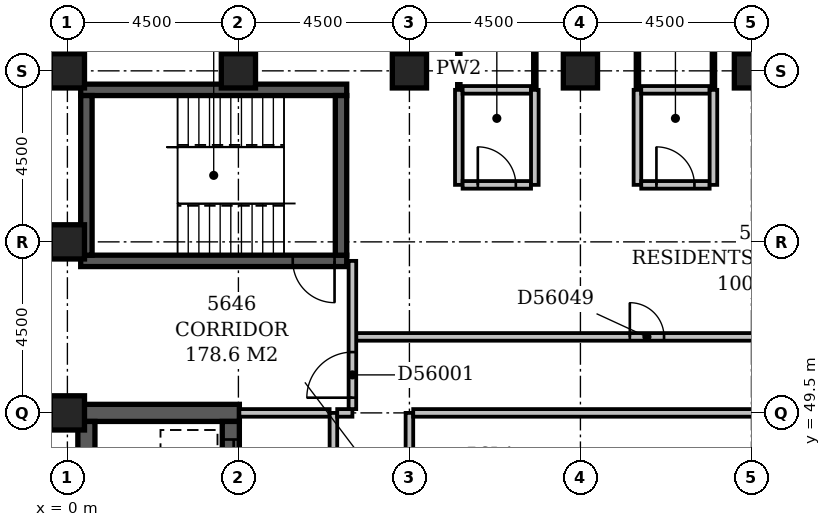
"""IFC4 building model, lengths in metres.
Left out: names, types, materials, properties, quantities, classifications, styles, units other than length and angle.
Written with IfcOpenShell. Run it as: python <this file> out.ifc"""

import sys

from ifc_helpers import new_model, si_unit, direction, frame, frame_2d, origin, origin_2d, place, context, subcontext, project, spatial, rectangle, extrude, element, fill, save


model = new_model("IFC4")
c1 = context("Model", 3, precision=1e-05, world=origin(), true_north=direction((0.0, 1.0)))
c2 = subcontext(c1, "Body", "Model", "MODEL_VIEW")
j1 = project(units=[si_unit("LENGTHUNIT", "METRE"), si_unit("PLANEANGLEUNIT", "RADIAN")], contexts=[c1])
p1 = place(None, origin())
s1 = spatial("IfcSite", under=j1, at=p1, CompositionType="ELEMENT")
p2 = place(p1, origin())
s2 = spatial("IfcBuilding", under=s1, at=p2, CompositionType="ELEMENT")
p3 = place(p2, frame((0.0, 0.0, 218.6)))
s3 = spatial("IfcBuildingStorey", under=s2, at=p3, CompositionType="ELEMENT", Elevation=218.6)
p4 = place(p3, frame((0.275, 49.5, -0.3), z_axis=(0.0, 0.0, 1.0), x_axis=(1.0, 0.0, 0.0)))
e1 = element("IfcWall", 1, at=p4, inside=s3, PredefinedType="SHEAR", context=c2, shape_type="SweptSolid", body=[
    extrude(rectangle(XDim=4.25, YDim=0.45, at=frame_2d((2.125, 0.0))), origin(), (0.0, 0.0, 1.0), 3.6),
])
p5 = place(p3, frame((0.35, 53.5, -0.3), z_axis=(0.0, 0.0, 1.0), x_axis=(1.0, 0.0, 0.0)))
e2 = element("IfcWall", 2, at=p5, inside=s3, PredefinedType="SHEAR", context=c2, shape_type="SweptSolid", body=[
    extrude(rectangle(XDim=7.0, YDim=0.3, at=frame_2d((3.5, 0.0))), origin(), (0.0, 0.0, 1.0), 3.6),
])
p6 = place(p5, frame((5.58, 0.0, 0.3)))
e3 = element("IfcOpeningElement", 3, at=p6, cuts=e2, PredefinedType="OPENING", context=c2, shape_type="SweptSolid", body=[
    extrude(rectangle(XDim=1.1, YDim=2.1, at=frame_2d((0.55, 1.05))), frame((0.0, 0.162, 0.0), z_axis=(0.0, -1.0, 0.0), x_axis=(1.0, 0.0, 0.0)), (0.0, 0.0, 1.0), 0.324),
])
p7 = place(p3, frame((0.35, 58.0, -0.3), z_axis=(0.0, 0.0, 1.0), x_axis=(1.0, 0.0, 0.0)))
e4 = element("IfcWall", 4, at=p7, inside=s3, PredefinedType="SHEAR", context=c2, shape_type="SweptSolid", body=[
    extrude(rectangle(XDim=7.0, YDim=0.3, at=frame_2d((3.5, 0.0))), origin(), (0.0, 0.0, 1.0), 3.6),
])
p8 = place(p3, frame((0.5, 27.15, -0.3), z_axis=(0.0, 0.0, 1.0), x_axis=(0.0, 1.0, 0.0)))
e5 = element("IfcWall", 5, at=p8, inside=s3, PredefinedType="SHEAR", context=c2, shape_type="SweptSolid", body=[
    extrude(rectangle(XDim=22.125, YDim=0.45, at=frame_2d((11.062, 0.0))), origin(), (0.0, 0.0, 1.0), 3.6),
])
p9 = place(p3, frame((0.5, 53.65, -0.3), z_axis=(0.0, 0.0, 1.0), x_axis=(0.0, 1.0, 0.0)))
e6 = element("IfcWall", 6, at=p9, inside=s3, PredefinedType="SHEAR", context=c2, shape_type="SweptSolid", body=[
    extrude(rectangle(XDim=4.2, YDim=0.3, at=frame_2d((2.1, 0.0))), origin(), (0.0, 0.0, 1.0), 3.6),
])
p10 = place(p3, frame((4.3, 27.15, -0.3), z_axis=(0.0, 0.0, 1.0), x_axis=(0.0, 1.0, 0.0)))
e7 = element("IfcWall", 7, at=p10, inside=s3, PredefinedType="SHEAR", context=c2, shape_type="SweptSolid", body=[
    extrude(rectangle(XDim=22.125, YDim=0.45, at=frame_2d((11.062, 0.0))), origin(), (0.0, 0.0, 1.0), 3.6),
])
p11 = place(p10, frame((3.05, 0.0, 0.3)))
e8 = element("IfcOpeningElement", 8, at=p11, cuts=e7, PredefinedType="OPENING", context=c2, shape_type="SweptSolid", body=[
    extrude(rectangle(XDim=1.1, YDim=2.1, at=frame_2d((0.55, 1.05))), frame((0.0, 0.237, 0.0), z_axis=(0.0, -1.0, 0.0), x_axis=(1.0, 0.0, 0.0)), (0.0, 0.0, 1.0), 0.474),
])
p12 = place(p10, frame((0.55, 0.0, 0.3)))
e9 = element("IfcOpeningElement", 9, at=p12, cuts=e7, PredefinedType="OPENING", context=c2, shape_type="SweptSolid", body=[
    extrude(rectangle(XDim=1.1, YDim=2.1, at=frame_2d((0.55, 1.05))), frame((0.0, 0.237, 0.0), z_axis=(0.0, -1.0, 0.0), x_axis=(1.0, 0.0, 0.0)), (0.0, 0.0, 1.0), 0.474),
])
p13 = place(p10, frame((20.55, 0.0, 0.3)))
e10 = element("IfcOpeningElement", 10, at=p13, cuts=e7, PredefinedType="OPENING", context=c2, shape_type="SweptSolid", body=[
    extrude(rectangle(XDim=1.1, YDim=2.1, at=frame_2d((0.55, 1.05))), frame((0.0, 0.237, 0.0), z_axis=(0.0, -1.0, 0.0), x_axis=(1.0, 0.0, 0.0)), (0.0, 0.0, 1.0), 0.474),
])
p14 = place(p10, frame((18.05, 0.0, 0.3)))
e11 = element("IfcOpeningElement", 11, at=p14, cuts=e7, PredefinedType="OPENING", context=c2, shape_type="SweptSolid", body=[
    extrude(rectangle(XDim=1.1, YDim=2.1, at=frame_2d((0.55, 1.05))), frame((0.0, 0.237, 0.0), z_axis=(0.0, -1.0, 0.0), x_axis=(1.0, 0.0, 0.0)), (0.0, 0.0, 1.0), 0.474),
])
p15 = place(p10, frame((15.55, 0.0, 0.3)))
e12 = element("IfcOpeningElement", 12, at=p15, cuts=e7, PredefinedType="OPENING", context=c2, shape_type="SweptSolid", body=[
    extrude(rectangle(XDim=1.1, YDim=2.1, at=frame_2d((0.55, 1.05))), frame((0.0, 0.237, 0.0), z_axis=(0.0, -1.0, 0.0), x_axis=(1.0, 0.0, 0.0)), (0.0, 0.0, 1.0), 0.474),
])
p16 = place(p10, frame((13.05, 0.0, 0.3)))
e13 = element("IfcOpeningElement", 13, at=p16, cuts=e7, PredefinedType="OPENING", context=c2, shape_type="SweptSolid", body=[
    extrude(rectangle(XDim=1.1, YDim=2.1, at=frame_2d((0.55, 1.05))), frame((0.0, 0.237, 0.0), z_axis=(0.0, -1.0, 0.0), x_axis=(1.0, 0.0, 0.0)), (0.0, 0.0, 1.0), 0.474),
])
p17 = place(p10, frame((10.55, 0.0, 0.3)))
e14 = element("IfcOpeningElement", 14, at=p17, cuts=e7, PredefinedType="OPENING", context=c2, shape_type="SweptSolid", body=[
    extrude(rectangle(XDim=1.1, YDim=2.1, at=frame_2d((0.55, 1.05))), frame((0.0, 0.237, 0.0), z_axis=(0.0, -1.0, 0.0), x_axis=(1.0, 0.0, 0.0)), (0.0, 0.0, 1.0), 0.474),
])
p18 = place(p10, frame((8.05, 0.0, 0.3)))
e15 = element("IfcOpeningElement", 15, at=p18, cuts=e7, PredefinedType="OPENING", context=c2, shape_type="SweptSolid", body=[
    extrude(rectangle(XDim=1.1, YDim=2.1, at=frame_2d((0.55, 1.05))), frame((0.0, 0.237, 0.0), z_axis=(0.0, -1.0, 0.0), x_axis=(1.0, 0.0, 0.0)), (0.0, 0.0, 1.0), 0.474),
])
p19 = place(p10, frame((5.55, 0.0, 0.3)))
e16 = element("IfcOpeningElement", 16, at=p19, cuts=e7, PredefinedType="OPENING", context=c2, shape_type="SweptSolid", body=[
    extrude(rectangle(XDim=1.1, YDim=2.1, at=frame_2d((0.55, 1.05))), frame((0.0, 0.237, 0.0), z_axis=(0.0, -1.0, 0.0), x_axis=(1.0, 0.0, 0.0)), (0.0, 0.0, 1.0), 0.474),
])
p20 = place(p3, frame((7.2, 53.65, -0.3), z_axis=(0.0, 0.0, 1.0), x_axis=(0.0, 1.0, 0.0)))
e17 = element("IfcWall", 17, at=p20, inside=s3, PredefinedType="SHEAR", context=c2, shape_type="SweptSolid", body=[
    extrude(rectangle(XDim=4.2, YDim=0.3, at=frame_2d((2.1, 0.0))), origin(), (0.0, 0.0, 1.0), 3.6),
])
for number, where, z_axis, x_axis in (
    (18, (0.0, 49.5, -0.3), (0.0, 0.0, 1.0), (1.0, 0.0, 0.0)),
    (19, (0.0, 54.0, -0.3), (0.0, 0.0, 1.0), (1.0, 0.0, 0.0)),
    (20, (0.0, 58.5, -0.3), (0.0, 0.0, 1.0), (1.0, 0.0, 0.0)),
    (21, (4.5, 58.5, -0.3), (0.0, 0.0, 1.0), (1.0, 0.0, 0.0)),
    (22, (9.0, 58.5, -0.3), (0.0, 0.0, 1.0), (1.0, 0.0, 0.0)),
    (23, (13.5, 58.5, -0.3), (0.0, 0.0, 1.0), (1.0, 0.0, 0.0)),
    (24, (18.0, 58.5, -0.3), (0.0, 0.0, 1.0), (1.0, 0.0, 0.0)),
):
    element("IfcColumn", number, at=place(p3, frame(where, z_axis=z_axis, x_axis=x_axis)), inside=s3, PredefinedType="COLUMN", context=c2, shape_type="SweptSolid", body=[
        extrude(rectangle(XDim=0.9, YDim=0.9, at=origin_2d()), origin(), (0.0, 0.0, 1.0), 3.6),
    ])
p21 = place(p3, frame((7.0, 34.6, 0.0), z_axis=(0.0, 0.0, 1.0), x_axis=(0.0, 1.0, 0.0)))
e25 = element("IfcWall", 25, at=p21, inside=s3, PredefinedType="PARTITIONING", context=c2, shape_type="SweptSolid", body=[
    extrude(rectangle(XDim=14.9, YDim=0.2, at=frame_2d((7.45, 0.0))), origin(), (0.0, 0.0, 1.0), 3.3),
])
p22 = place(p21, frame((2.8, 0.0, 0.0)))
e26 = element("IfcOpeningElement", 26, at=p22, cuts=e25, PredefinedType="OPENING", context=c2, shape_type="SweptSolid", body=[
    extrude(rectangle(XDim=1.2, YDim=2.1, at=frame_2d((0.6, 1.05))), frame((0.0, 0.112, 0.0), z_axis=(0.0, -1.0, 0.0), x_axis=(1.0, 0.0, 0.0)), (0.0, 0.0, 1.0), 0.224),
])
p23 = place(p21, frame((9.8, 0.0, 0.0)))
e27 = element("IfcOpeningElement", 27, at=p23, cuts=e25, PredefinedType="OPENING", context=c2, shape_type="SweptSolid", body=[
    extrude(rectangle(XDim=1.2, YDim=2.1, at=frame_2d((0.6, 1.05))), frame((0.0, 0.112, 0.0), z_axis=(0.0, -1.0, 0.0), x_axis=(1.0, 0.0, 0.0)), (0.0, 0.0, 1.0), 0.224),
])
p24 = place(p3, frame((4.525, 49.5, 0.0), z_axis=(0.0, 0.0, 1.0), x_axis=(1.0, 0.0, 0.0)))
e28 = element("IfcWall", 28, at=p24, inside=s3, PredefinedType="PARTITIONING", context=c2, shape_type="SweptSolid", body=[
    extrude(rectangle(XDim=2.375, YDim=0.2, at=frame_2d((1.188, 0.0))), origin(), (0.0, 0.0, 1.0), 3.3),
])
p25 = place(p3, frame((7.1, 49.5, 0.0), z_axis=(0.0, 0.0, 1.0), x_axis=(1.0, 0.0, 0.0)))
e29 = element("IfcWall", 29, at=p25, inside=s3, PredefinedType="PARTITIONING", context=c2, shape_type="SweptSolid", body=[
    extrude(rectangle(XDim=0.4, YDim=0.2, at=frame_2d((0.2, 0.0))), origin(), (0.0, 0.0, 1.0), 3.3),
])
p26 = place(p3, frame((7.5, 49.6, 0.0), z_axis=(0.0, 0.0, 1.0), x_axis=(0.0, 1.0, 0.0)))
e30 = element("IfcWall", 30, at=p26, inside=s3, PredefinedType="PARTITIONING", context=c2, shape_type="SweptSolid", body=[
    extrude(rectangle(XDim=3.9, YDim=0.2, at=frame_2d((1.95, 0.0))), origin(), (0.0, 0.0, 1.0), 3.3),
])
p27 = place(p26, frame((0.3, 0.0, 0.0)))
e31 = element("IfcOpeningElement", 31, at=p27, cuts=e30, PredefinedType="OPENING", context=c2, shape_type="SweptSolid", body=[
    extrude(rectangle(XDim=1.2, YDim=2.1, at=frame_2d((0.6, 1.05))), frame((0.0, 0.112, 0.0), z_axis=(0.0, -1.0, 0.0), x_axis=(1.0, 0.0, 0.0)), (0.0, 0.0, 1.0), 0.224),
])
p28 = place(p3, frame((9.0, 38.0, 0.0), z_axis=(0.0, 0.0, 1.0), x_axis=(0.0, 1.0, 0.0)))
e32 = element("IfcWall", 32, at=p28, inside=s3, PredefinedType="PARTITIONING", context=c2, shape_type="SweptSolid", body=[
    extrude(rectangle(XDim=11.5, YDim=0.2, at=frame_2d((5.75, 0.0))), origin(), (0.0, 0.0, 1.0), 3.3),
])
p29 = place(p28, frame((5.25, 0.0, 0.0)))
e33 = element("IfcOpeningElement", 33, at=p29, cuts=e32, PredefinedType="OPENING", context=c2, shape_type="SweptSolid", body=[
    extrude(rectangle(XDim=0.9, YDim=2.1, at=frame_2d((0.45, 1.05))), frame((0.0, 0.112, 0.0), z_axis=(0.0, -1.0, 0.0), x_axis=(1.0, 0.0, 0.0)), (0.0, 0.0, 1.0), 0.224),
])
p30 = place(p3, frame((9.1, 49.5, 0.0), z_axis=(0.0, 0.0, 1.0), x_axis=(1.0, 0.0, 0.0)))
e34 = element("IfcWall", 34, at=p30, inside=s3, PredefinedType="PARTITIONING", context=c2, shape_type="SweptSolid", body=[
    extrude(rectangle(XDim=11.3, YDim=0.2, at=frame_2d((5.65, 0.0))), origin(), (0.0, 0.0, 1.0), 3.3),
])
p31 = place(p3, frame((7.6, 51.5, 0.0), z_axis=(0.0, 0.0, 1.0), x_axis=(1.0, 0.0, 0.0)))
e35 = element("IfcWall", 35, at=p31, inside=s3, PredefinedType="PARTITIONING", context=c2, shape_type="SweptSolid", body=[
    extrude(rectangle(XDim=15.3, YDim=0.2, at=frame_2d((7.65, 0.0))), origin(), (0.0, 0.0, 1.0), 3.3),
])
p32 = place(p31, frame((7.2, 0.0, 0.0)))
e36 = element("IfcOpeningElement", 36, at=p32, cuts=e35, PredefinedType="OPENING", context=c2, shape_type="SweptSolid", body=[
    extrude(rectangle(XDim=0.9, YDim=2.1, at=frame_2d((0.45, 1.05))), frame((0.0, 0.112, 0.0), z_axis=(0.0, -1.0, 0.0), x_axis=(1.0, 0.0, 0.0)), (0.0, 0.0, 1.0), 0.224),
])
p33 = place(p3, frame((10.3, 55.5, 0.0), z_axis=(0.0, 0.0, 1.0), x_axis=(0.0, 1.0, 0.0)))
e37 = element("IfcWall", 37, at=p33, inside=s3, PredefinedType="PARTITIONING", context=c2, shape_type="SweptSolid", body=[
    extrude(rectangle(XDim=2.5, YDim=0.2, at=frame_2d((1.25, 0.0))), origin(), (0.0, 0.0, 1.0), 3.3),
])
p34 = place(p3, frame((10.4, 55.5, 0.0), z_axis=(0.0, 0.0, 1.0), x_axis=(1.0, 0.0, 0.0)))
e38 = element("IfcWall", 38, at=p34, inside=s3, PredefinedType="PARTITIONING", context=c2, shape_type="SweptSolid", body=[
    extrude(rectangle(XDim=1.8, YDim=0.2, at=frame_2d((0.9, 0.0))), origin(), (0.0, 0.0, 1.0), 3.3),
])
p35 = place(p34, frame((0.4, 0.0, 0.0)))
e39 = element("IfcOpeningElement", 39, at=p35, cuts=e38, PredefinedType="OPENING", context=c2, shape_type="SweptSolid", body=[
    extrude(rectangle(XDim=1.0, YDim=2.1, at=frame_2d((0.5, 1.05))), frame((0.0, 0.112, 0.0), z_axis=(0.0, -1.0, 0.0), x_axis=(1.0, 0.0, 0.0)), (0.0, 0.0, 1.0), 0.224),
])
for number, where, z_axis, x_axis in (
    (40, (12.3, 55.5, 0.0), (0.0, 0.0, 1.0), (0.0, 1.0, 0.0)),
    (41, (15.0, 55.5, 0.0), (0.0, 0.0, 1.0), (0.0, 1.0, 0.0)),
):
    element("IfcWall", number, at=place(p3, frame(where, z_axis=z_axis, x_axis=x_axis)), inside=s3, PredefinedType="PARTITIONING", context=c2, shape_type="SweptSolid", body=[
        extrude(rectangle(XDim=2.5, YDim=0.2, at=frame_2d((1.25, 0.0))), origin(), (0.0, 0.0, 1.0), 3.3),
    ])
p36 = place(p3, frame((15.1, 55.5, 0.0), z_axis=(0.0, 0.0, 1.0), x_axis=(1.0, 0.0, 0.0)))
e42 = element("IfcWall", 42, at=p36, inside=s3, PredefinedType="PARTITIONING", context=c2, shape_type="SweptSolid", body=[
    extrude(rectangle(XDim=1.8, YDim=0.2, at=frame_2d((0.9, 0.0))), origin(), (0.0, 0.0, 1.0), 3.3),
])
p37 = place(p36, frame((0.4, 0.0, 0.0)))
e43 = element("IfcOpeningElement", 43, at=p37, cuts=e42, PredefinedType="OPENING", context=c2, shape_type="SweptSolid", body=[
    extrude(rectangle(XDim=1.0, YDim=2.1, at=frame_2d((0.5, 1.05))), frame((0.0, 0.112, 0.0), z_axis=(0.0, -1.0, 0.0), x_axis=(1.0, 0.0, 0.0)), (0.0, 0.0, 1.0), 0.224),
])
p38 = place(p3, frame((17.0, 55.5, 0.0), z_axis=(0.0, 0.0, 1.0), x_axis=(0.0, 1.0, 0.0)))
e44 = element("IfcWall", 44, at=p38, inside=s3, PredefinedType="PARTITIONING", context=c2, shape_type="SweptSolid", body=[
    extrude(rectangle(XDim=2.5, YDim=0.2, at=frame_2d((1.25, 0.0))), origin(), (0.0, 0.0, 1.0), 3.3),
])
p39 = place(p3, frame((10.3, 58.0, 0.0), z_axis=(0.0, 0.0, 1.0), x_axis=(0.0, 1.0, 0.0)))
e45 = element("IfcWall", 45, at=p39, inside=s3, PredefinedType="PARTITIONING", context=c2, shape_type="SweptSolid", body=[
    extrude(rectangle(XDim=1.1, YDim=0.1, at=frame_2d((0.55, 0.0))), origin(), (0.0, 0.0, 1.0), 3.3),
])
p40 = place(p3, frame((10.4, 58.0, 0.0), z_axis=(0.0, 0.0, 1.0), x_axis=(1.0, 0.0, 0.0)))
e46 = element("IfcWall", 46, at=p40, inside=s3, PredefinedType="PARTITIONING", context=c2, shape_type="SweptSolid", body=[
    extrude(rectangle(XDim=1.8, YDim=0.2, at=frame_2d((0.9, 0.0))), origin(), (0.0, 0.0, 1.0), 3.3),
])
for number, where, z_axis, x_axis in (
    (47, (12.3, 58.0, 0.0), (0.0, 0.0, 1.0), (0.0, 1.0, 0.0)),
    (48, (15.0, 58.0, 0.0), (0.0, 0.0, 1.0), (0.0, 1.0, 0.0)),
):
    element("IfcWall", number, at=place(p3, frame(where, z_axis=z_axis, x_axis=x_axis)), inside=s3, PredefinedType="PARTITIONING", context=c2, shape_type="SweptSolid", body=[
        extrude(rectangle(XDim=1.1, YDim=0.1, at=frame_2d((0.55, 0.0))), origin(), (0.0, 0.0, 1.0), 3.3),
    ])
p41 = place(p3, frame((15.1, 58.0, 0.0), z_axis=(0.0, 0.0, 1.0), x_axis=(1.0, 0.0, 0.0)))
e49 = element("IfcWall", 49, at=p41, inside=s3, PredefinedType="PARTITIONING", context=c2, shape_type="SweptSolid", body=[
    extrude(rectangle(XDim=1.8, YDim=0.2, at=frame_2d((0.9, 0.0))), origin(), (0.0, 0.0, 1.0), 3.3),
])
p42 = place(p3, frame((17.0, 58.0, 0.0), z_axis=(0.0, 0.0, 1.0), x_axis=(0.0, 1.0, 0.0)))
e50 = element("IfcWall", 50, at=p42, inside=s3, PredefinedType="PARTITIONING", context=c2, shape_type="SweptSolid", body=[
    extrude(rectangle(XDim=1.1, YDim=0.1, at=frame_2d((0.55, 0.0))), origin(), (0.0, 0.0, 1.0), 3.3),
])
p43 = place(p27, origin())
e51 = element("IfcDoor", 51, at=p43, inside=s3, OperationType="SINGLE_SWING_LEFT", PredefinedType="DOOR", context=c2, shape_type="SweptSolid", body=[
    extrude(rectangle(XDim=1.2, YDim=2.1, at=frame_2d((0.6, 1.05))), frame((0.0, 0.025, 0.0), z_axis=(0.0, -1.0, 0.0), x_axis=(1.0, 0.0, 0.0)), (0.0, 0.0, 1.0), 0.05),
])
fill(e31, e51)
p44 = place(p13, origin())
e52 = element("IfcDoor", 52, at=p44, inside=s3, OperationType="SLIDING_TO_LEFT", PredefinedType="DOOR", context=c2, shape_type="SweptSolid", body=[
    extrude(rectangle(XDim=1.1, YDim=2.1, at=frame_2d((0.55, 1.05))), frame((0.0, 0.025, 0.0), z_axis=(0.0, -1.0, 0.0), x_axis=(1.0, 0.0, 0.0)), (0.0, 0.0, 1.0), 0.05),
])
fill(e10, e52)
p45 = place(p6, origin())
e53 = element("IfcDoor", 53, at=p45, inside=s3, OperationType="SINGLE_SWING_RIGHT", PredefinedType="DOOR", context=c2, shape_type="SweptSolid", body=[
    extrude(rectangle(XDim=1.1, YDim=2.1, at=frame_2d((0.55, 1.05))), frame((0.0, 0.025, 0.0), z_axis=(0.0, -1.0, 0.0), x_axis=(1.0, 0.0, 0.0)), (0.0, 0.0, 1.0), 0.05),
])
fill(e3, e53)
p46 = place(p32, origin())
e54 = element("IfcDoor", 54, at=p46, inside=s3, OperationType="SINGLE_SWING_LEFT", PredefinedType="DOOR", context=c2, shape_type="SweptSolid", body=[
    extrude(rectangle(XDim=0.9, YDim=2.1, at=frame_2d((0.45, 1.05))), frame((0.0, 0.025, 0.0), z_axis=(0.0, -1.0, 0.0), x_axis=(1.0, 0.0, 0.0)), (0.0, 0.0, 1.0), 0.05),
])
fill(e36, e54)
p47 = place(p35, origin())
e55 = element("IfcDoor", 55, at=p47, inside=s3, OperationType="SINGLE_SWING_LEFT", PredefinedType="DOOR", context=c2, shape_type="SweptSolid", body=[
    extrude(rectangle(XDim=1.0, YDim=2.1, at=frame_2d((0.5, 1.05))), frame((0.0, 0.025, 0.0), z_axis=(0.0, -1.0, 0.0), x_axis=(1.0, 0.0, 0.0)), (0.0, 0.0, 1.0), 0.05),
])
fill(e39, e55)
p48 = place(p37, origin())
e56 = element("IfcDoor", 56, at=p48, inside=s3, OperationType="SINGLE_SWING_LEFT", PredefinedType="DOOR", context=c2, shape_type="SweptSolid", body=[
    extrude(rectangle(XDim=1.0, YDim=2.1, at=frame_2d((0.5, 1.05))), frame((0.0, 0.025, 0.0), z_axis=(0.0, -1.0, 0.0), x_axis=(1.0, 0.0, 0.0)), (0.0, 0.0, 1.0), 0.05),
])
fill(e43, e56)
save(model, sys.argv[1])
